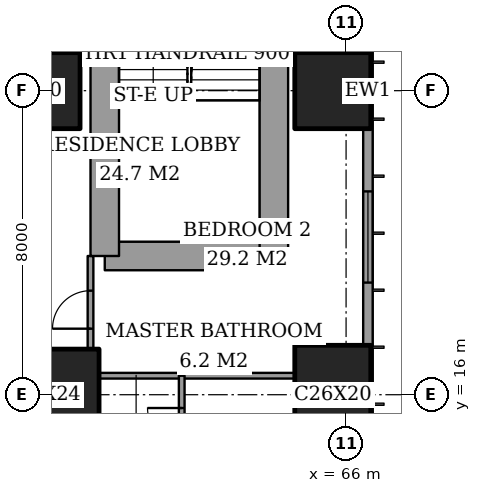
"""IFC4 building model, lengths in metres.
Left out: names, types, materials, properties, quantities, classifications, styles, units other than length and angle.
Written with IfcOpenShell. Run it as: python <this file> out.ifc"""

import sys

from ifc_helpers import new_model, si_unit, direction, frame, frame_2d, origin, origin_2d, place, context, subcontext, project, spatial, rectangle, extrude, element, fill, save


model = new_model("IFC4")
c1 = context("Model", 3, precision=1e-05, world=origin(), true_north=direction((0.0, 1.0)))
c2 = subcontext(c1, "Body", "Model", "MODEL_VIEW")
j1 = project(units=[si_unit("LENGTHUNIT", "METRE"), si_unit("PLANEANGLEUNIT", "RADIAN")], contexts=[c1])
p1 = place(None, origin())
s1 = spatial("IfcSite", under=j1, at=p1, CompositionType="ELEMENT")
p2 = place(p1, origin())
s2 = spatial("IfcBuilding", under=s1, at=p2, CompositionType="ELEMENT")
p3 = place(p2, frame((0.0, 0.0, 114.2)))
s3 = spatial("IfcBuildingStorey", under=s2, at=p3, CompositionType="ELEMENT", Elevation=114.2)
p4 = place(p3, frame((58.0, 16.0, 0.0), z_axis=(0.0, 0.0, 1.0), x_axis=(1.0, 0.0, 0.0)))
e1 = element("IfcColumn", 1, at=p4, inside=s3, PredefinedType="COLUMN", context=c2, shape_type="SweptSolid", body=[
    extrude(rectangle(XDim=3.0, YDim=2.4, at=origin_2d()), origin(), (0.0, 0.0, 1.0), 3.6),
])
p5 = place(p3, frame((58.0, 24.0, 0.0), z_axis=(0.0, 0.0, 1.0), x_axis=(1.0, 0.0, 0.0)))
e2 = element("IfcColumn", 2, at=p5, inside=s3, PredefinedType="COLUMN", context=c2, shape_type="SweptSolid", body=[
    extrude(rectangle(XDim=2.0, YDim=2.0, at=origin_2d()), origin(), (0.0, 0.0, 1.0), 3.6),
])
p6 = place(p3, frame((65.65, 16.0, 0.0), z_axis=(0.0, 0.0, 1.0), x_axis=(0.0, 1.0, 0.0)))
e3 = element("IfcColumn", 3, at=p6, inside=s3, PredefinedType="COLUMN", context=c2, shape_type="SweptSolid", body=[
    extrude(rectangle(XDim=2.6, YDim=2.0, at=origin_2d()), origin(), (0.0, 0.0, 1.0), 3.6),
])
p7 = place(p3, frame((65.65, 24.0, 0.0), z_axis=(0.0, 0.0, 1.0), x_axis=(1.0, 0.0, 0.0)))
e4 = element("IfcColumn", 4, at=p7, inside=s3, PredefinedType="COLUMN", context=c2, shape_type="SweptSolid", body=[
    extrude(rectangle(XDim=2.0, YDim=2.0, at=origin_2d()), origin(), (0.0, 0.0, 1.0), 3.6),
])
p8 = place(p3, frame((59.65, 19.65, 0.0), z_axis=(0.0, 0.0, 1.0), x_axis=(1.0, 0.0, 0.0)))
e5 = element("IfcWall", 5, at=p8, inside=s3, PredefinedType="SHEAR", context=c2, shape_type="SweptSolid", body=[
    extrude(rectangle(XDim=4.45, YDim=0.75, at=frame_2d((2.225, 0.0))), origin(), (0.0, 0.0, 1.0), 3.6),
])
p9 = place(p3, frame((64.1, 19.65, 0.0), z_axis=(0.0, 0.0, 1.0), x_axis=(0.0, 1.0, 0.0)))
e6 = element("IfcWall", 6, at=p9, inside=s3, PredefinedType="SHEAR", context=c2, shape_type="SweptSolid", body=[
    extrude(rectangle(XDim=8.7, YDim=0.75, at=frame_2d((4.35, 0.0))), origin(), (0.0, 0.0, 1.0), 3.6),
])
p10 = place(p3, frame((59.65, 28.35, 0.0), z_axis=(0.0, 0.0, 1.0), x_axis=(0.0, -1.0, 0.0)))
e7 = element("IfcWall", 7, at=p10, inside=s3, PredefinedType="SHEAR", context=c2, shape_type="SweptSolid", body=[
    extrude(rectangle(XDim=8.7, YDim=0.75, at=frame_2d((4.35, 0.0))), origin(), (0.0, 0.0, 1.0), 3.6),
])
p11 = place(p10, frame((0.975, 0.0, 0.0)))
e8 = element("IfcOpeningElement", 8, at=p11, cuts=e7, PredefinedType="OPENING", context=c2, shape_type="SweptSolid", body=[
    extrude(rectangle(XDim=1.0, YDim=2.1, at=frame_2d((0.5, 1.05))), frame((0.0, 0.385, 0.0), z_axis=(0.0, -1.0, 0.0), x_axis=(1.0, 0.0, 0.0)), (0.0, 0.0, 1.0), 0.77),
])
p12 = place(p3, frame((66.575, 3.175, 0.0), z_axis=(0.0, 0.0, 1.0), x_axis=(0.0, 1.0, 0.0)))
e9 = element("IfcWall", 9, at=p12, inside=s3, PredefinedType="SOLIDWALL", context=c2, shape_type="SweptSolid", body=[
    extrude(rectangle(XDim=41.65, YDim=0.25, at=frame_2d((20.825, 0.0))), origin(), (0.0, 0.0, 1.0), 3.6),
])
p13 = place(p12, frame((0.775, 0.0, 0.4)))
e10 = element("IfcOpeningElement", 10, at=p13, cuts=e9, PredefinedType="OPENING", context=c2, shape_type="SweptSolid", body=[
    extrude(rectangle(XDim=2.4, YDim=2.2, at=frame_2d((1.2, 1.1))), frame((0.0, 0.135, 0.0), z_axis=(0.0, -1.0, 0.0), x_axis=(1.0, 0.0, 0.0)), (0.0, 0.0, 1.0), 0.27),
])
p14 = place(p12, frame((6.1, 0.0, 0.4)))
e11 = element("IfcOpeningElement", 11, at=p14, cuts=e9, PredefinedType="OPENING", context=c2, shape_type="SweptSolid", body=[
    extrude(rectangle(XDim=1.2, YDim=2.2, at=frame_2d((0.6, 1.1))), frame((0.0, 0.135, 0.0), z_axis=(0.0, -1.0, 0.0), x_axis=(1.0, 0.0, 0.0)), (0.0, 0.0, 1.0), 0.27),
])
p15 = place(p12, frame((8.275, 0.0, 0.4)))
e12 = element("IfcOpeningElement", 12, at=p15, cuts=e9, PredefinedType="OPENING", context=c2, shape_type="SweptSolid", body=[
    extrude(rectangle(XDim=2.4, YDim=2.2, at=frame_2d((1.2, 1.1))), frame((0.0, 0.135, 0.0), z_axis=(0.0, -1.0, 0.0), x_axis=(1.0, 0.0, 0.0)), (0.0, 0.0, 1.0), 0.27),
])
p16 = place(p12, frame((15.775, 0.0, 0.4)))
e13 = element("IfcOpeningElement", 13, at=p16, cuts=e9, PredefinedType="OPENING", context=c2, shape_type="SweptSolid", body=[
    extrude(rectangle(XDim=2.4, YDim=2.2, at=frame_2d((1.2, 1.1))), frame((0.0, 0.135, 0.0), z_axis=(0.0, -1.0, 0.0), x_axis=(1.0, 0.0, 0.0)), (0.0, 0.0, 1.0), 0.27),
])
p17 = place(p12, frame((23.475, 0.0, 0.4)))
e14 = element("IfcOpeningElement", 14, at=p17, cuts=e9, PredefinedType="OPENING", context=c2, shape_type="SweptSolid", body=[
    extrude(rectangle(XDim=2.4, YDim=2.2, at=frame_2d((1.2, 1.1))), frame((0.0, 0.135, 0.0), z_axis=(0.0, -1.0, 0.0), x_axis=(1.0, 0.0, 0.0)), (0.0, 0.0, 1.0), 0.27),
])
p18 = place(p12, frame((30.975, 0.0, 0.4)))
e15 = element("IfcOpeningElement", 15, at=p18, cuts=e9, PredefinedType="OPENING", context=c2, shape_type="SweptSolid", body=[
    extrude(rectangle(XDim=2.4, YDim=2.2, at=frame_2d((1.2, 1.1))), frame((0.0, 0.135, 0.0), z_axis=(0.0, -1.0, 0.0), x_axis=(1.0, 0.0, 0.0)), (0.0, 0.0, 1.0), 0.27),
])
p19 = place(p12, frame((34.5, 0.0, 0.4)))
e16 = element("IfcOpeningElement", 16, at=p19, cuts=e9, PredefinedType="OPENING", context=c2, shape_type="SweptSolid", body=[
    extrude(rectangle(XDim=1.2, YDim=2.2, at=frame_2d((0.6, 1.1))), frame((0.0, 0.135, 0.0), z_axis=(0.0, -1.0, 0.0), x_axis=(1.0, 0.0, 0.0)), (0.0, 0.0, 1.0), 0.27),
])
p20 = place(p12, frame((38.475, 0.0, 0.4)))
e17 = element("IfcOpeningElement", 17, at=p20, cuts=e9, PredefinedType="OPENING", context=c2, shape_type="SweptSolid", body=[
    extrude(rectangle(XDim=2.4, YDim=2.2, at=frame_2d((1.2, 1.1))), frame((0.0, 0.135, 0.0), z_axis=(0.0, -1.0, 0.0), x_axis=(1.0, 0.0, 0.0)), (0.0, 0.0, 1.0), 0.27),
])
p21 = place(p3, frame((59.5, 16.5, 0.0), z_axis=(0.0, 0.0, 1.0), x_axis=(1.0, 0.0, 0.0)))
e18 = element("IfcWall", 18, at=p21, inside=s3, PredefinedType="PARTITIONING", context=c2, shape_type="SweptSolid", body=[
    extrude(rectangle(XDim=5.15, YDim=0.15, at=frame_2d((2.575, 0.0))), origin(), (0.0, 0.0, 1.0), 3.35),
])
p22 = place(p3, frame((59.275, 17.2, 0.0), z_axis=(0.0, 0.0, 1.0), x_axis=(0.0, 1.0, 0.0)))
e19 = element("IfcWall", 19, at=p22, inside=s3, PredefinedType="PARTITIONING", context=c2, shape_type="SweptSolid", body=[
    extrude(rectangle(XDim=2.45, YDim=0.15, at=frame_2d((1.225, 0.0))), origin(), (0.0, 0.0, 1.0), 3.35),
])
p23 = place(p22, frame((0.538, 0.0, 0.0)))
e20 = element("IfcOpeningElement", 20, at=p23, cuts=e19, PredefinedType="OPENING", context=c2, shape_type="SweptSolid", body=[
    extrude(rectangle(XDim=1.0, YDim=2.1, at=frame_2d((0.5, 1.05))), frame((0.0, 0.085, 0.0), z_axis=(0.0, -1.0, 0.0), x_axis=(1.0, 0.0, 0.0)), (0.0, 0.0, 1.0), 0.17),
])
p24 = place(p3, frame((61.675, 13.9, 0.0), z_axis=(0.0, 0.0, 1.0), x_axis=(0.0, 1.0, 0.0)))
e21 = element("IfcWall", 21, at=p24, inside=s3, PredefinedType="PARTITIONING", context=c2, shape_type="SweptSolid", body=[
    extrude(rectangle(XDim=2.6, YDim=0.15, at=frame_2d((1.3, 0.0))), origin(), (0.0, 0.0, 1.0), 3.35),
])
p25 = place(p24, frame((0.85, 0.0, 0.0)))
e22 = element("IfcOpeningElement", 22, at=p25, cuts=e21, PredefinedType="OPENING", context=c2, shape_type="SweptSolid", body=[
    extrude(rectangle(XDim=0.9, YDim=2.1, at=frame_2d((0.45, 1.05))), frame((0.0, 0.085, 0.0), z_axis=(0.0, -1.0, 0.0), x_axis=(1.0, 0.0, 0.0)), (0.0, 0.0, 1.0), 0.17),
])
p26 = place(p16, origin())
e23 = element("IfcWindow", 23, at=p26, inside=s3, PartitioningType="SINGLE_PANEL", PredefinedType="WINDOW", context=c2, shape_type="SweptSolid", body=[
    extrude(rectangle(XDim=2.4, YDim=2.2, at=frame_2d((1.2, 1.1))), frame((0.0, 0.03, 0.0), z_axis=(0.0, -1.0, 0.0), x_axis=(1.0, 0.0, 0.0)), (0.0, 0.0, 1.0), 0.06),
])
fill(e13, e23)
p27 = place(p25, origin())
e24 = element("IfcDoor", 24, at=p27, inside=s3, OperationType="SINGLE_SWING_LEFT", PredefinedType="DOOR", context=c2, shape_type="SweptSolid", body=[
    extrude(rectangle(XDim=0.9, YDim=2.1, at=frame_2d((0.45, 1.05))), frame((0.0, 0.025, 0.0), z_axis=(0.0, -1.0, 0.0), x_axis=(1.0, 0.0, 0.0)), (0.0, 0.0, 1.0), 0.05),
])
fill(e22, e24)
p28 = place(p23, origin())
e25 = element("IfcDoor", 25, at=p28, inside=s3, OperationType="SINGLE_SWING_RIGHT", PredefinedType="DOOR", context=c2, shape_type="SweptSolid", body=[
    extrude(rectangle(XDim=1.0, YDim=2.1, at=frame_2d((0.5, 1.05))), frame((0.0, 0.025, 0.0), z_axis=(0.0, -1.0, 0.0), x_axis=(1.0, 0.0, 0.0)), (0.0, 0.0, 1.0), 0.05),
])
fill(e20, e25)
save(model, sys.argv[1])
